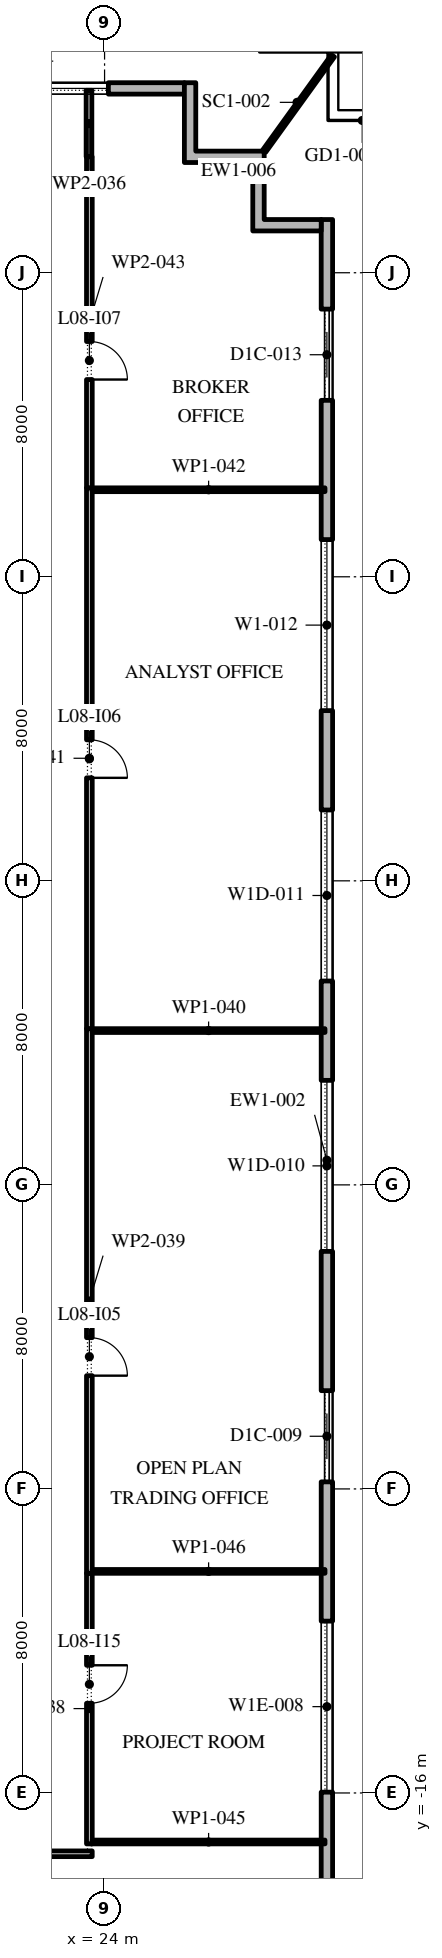
"""IFC4 building model, lengths in metres.
Left out: names, types, materials, properties, quantities, classifications, styles, units other than length and angle.
Written with IfcOpenShell. Run it as: python <this file> out.ifc"""

import sys

from ifc_helpers import new_model, si_unit, direction, frame, frame_2d, origin, place, context, subcontext, project, spatial, polyline, rectangle, outline, extrude, element, fill, save


model = new_model("IFC4")
c1 = context("Model", 3, precision=1e-05, world=origin(), true_north=direction((0.0, 1.0)))
c2 = subcontext(c1, "Body", "Model", "MODEL_VIEW")
j1 = project(units=[si_unit("LENGTHUNIT", "METRE"), si_unit("PLANEANGLEUNIT", "RADIAN")], contexts=[c1])
p1 = place(None, origin())
s1 = spatial("IfcSite", under=j1, at=p1, CompositionType="ELEMENT")
p2 = place(p1, origin())
s2 = spatial("IfcBuilding", under=s1, at=p2, CompositionType="ELEMENT")
p3 = place(p2, frame((0.0, 0.0, 43.8)))
s3 = spatial("IfcBuildingStorey", under=s2, at=p3, CompositionType="ELEMENT", Elevation=43.8)
p4 = place(p3, frame((29.85, -24.1, 0.0), z_axis=(0.0, 0.0, 1.0), x_axis=(0.0, 1.0, 0.0)))
e1 = element("IfcWall", 1, at=p4, inside=s3, PredefinedType="STANDARD", context=c2, shape_type="SweptSolid", body=[
    extrude(rectangle(XDim=49.5, YDim=0.3, at=frame_2d((24.75, 0.0))), origin(), (0.0, 0.0, 1.0), 4.0),
])
p5 = place(p4, frame((1.157, 0.0, 0.45)))
e2 = element("IfcOpeningElement", 2, at=p5, cuts=e1, PredefinedType="OPENING", context=c2, shape_type="SweptSolid", body=[
    extrude(rectangle(XDim=4.5, YDim=3.05, at=frame_2d((2.25, 1.525))), frame((0.0, 0.16, 0.0), z_axis=(0.0, -1.0, 0.0), x_axis=(1.0, 0.0, 0.0)), (0.0, 0.0, 1.0), 0.32),
])
p6 = place(p4, frame((8.121, 0.0, 0.45)))
e3 = element("IfcOpeningElement", 3, at=p6, cuts=e1, PredefinedType="OPENING", context=c2, shape_type="SweptSolid", body=[
    extrude(rectangle(XDim=4.5, YDim=2.825, at=frame_2d((2.25, 1.413))), frame((0.0, 0.16, 0.0), z_axis=(0.0, -1.0, 0.0), x_axis=(1.0, 0.0, 0.0)), (0.0, 0.0, 1.0), 0.32),
])
p7 = place(p4, frame((16.286, 0.0, 0.0)))
e4 = element("IfcOpeningElement", 4, at=p7, cuts=e1, PredefinedType="OPENING", context=c2, shape_type="SweptSolid", body=[
    extrude(rectangle(XDim=2.4, YDim=3.325, at=frame_2d((1.2, 1.663))), frame((0.0, 0.16, 0.0), z_axis=(0.0, -1.0, 0.0), x_axis=(1.0, 0.0, 0.0)), (0.0, 0.0, 1.0), 0.32),
])
p8 = place(p4, frame((22.35, 0.0, 0.45)))
e5 = element("IfcOpeningElement", 5, at=p8, cuts=e1, PredefinedType="OPENING", context=c2, shape_type="SweptSolid", body=[
    extrude(rectangle(XDim=4.5, YDim=2.875, at=frame_2d((2.25, 1.438))), frame((0.0, 0.16, 0.0), z_axis=(0.0, -1.0, 0.0), x_axis=(1.0, 0.0, 0.0)), (0.0, 0.0, 1.0), 0.32),
])
p9 = place(p4, frame((29.464, 0.0, 0.45)))
e6 = element("IfcOpeningElement", 6, at=p9, cuts=e1, PredefinedType="OPENING", context=c2, shape_type="SweptSolid", body=[
    extrude(rectangle(XDim=4.5, YDim=2.875, at=frame_2d((2.25, 1.438))), frame((0.0, 0.16, 0.0), z_axis=(0.0, -1.0, 0.0), x_axis=(1.0, 0.0, 0.0)), (0.0, 0.0, 1.0), 0.32),
])
p10 = place(p4, frame((36.579, 0.0, 0.45)))
e7 = element("IfcOpeningElement", 7, at=p10, cuts=e1, PredefinedType="OPENING", context=c2, shape_type="SweptSolid", body=[
    extrude(rectangle(XDim=4.5, YDim=3.05, at=frame_2d((2.25, 1.525))), frame((0.0, 0.16, 0.0), z_axis=(0.0, -1.0, 0.0), x_axis=(1.0, 0.0, 0.0)), (0.0, 0.0, 1.0), 0.32),
])
p11 = place(p4, frame((44.743, 0.0, 0.0)))
e8 = element("IfcOpeningElement", 8, at=p11, cuts=e1, PredefinedType="OPENING", context=c2, shape_type="SweptSolid", body=[
    extrude(rectangle(XDim=2.4, YDim=3.325, at=frame_2d((1.2, 1.663))), frame((0.0, 0.16, 0.0), z_axis=(0.0, -1.0, 0.0), x_axis=(1.0, 0.0, 0.0)), (0.0, 0.0, 1.0), 0.32),
])
p12 = place(p3, frame((26.1, 28.85, 0.0), z_axis=(0.0, 0.0, 1.0), x_axis=(-1.0, 0.0, 0.0)))
e9 = element("IfcWall", 9, at=p12, inside=s3, PredefinedType="STANDARD", context=c2, shape_type="SweptSolid", body=[
    extrude(rectangle(XDim=52.5, YDim=0.3, at=frame_2d((26.25, 0.0))), origin(), (0.0, 0.0, 1.0), 4.0),
])
p13 = place(p12, frame((2.0, 0.0, 0.45)))
e10 = element("IfcOpeningElement", 10, at=p13, cuts=e9, PredefinedType="OPENING", context=c2, shape_type="SweptSolid", body=[
    extrude(rectangle(XDim=4.5, YDim=3.05, at=frame_2d((2.25, 1.525))), frame((0.0, 0.16, 0.0), z_axis=(0.0, -1.0, 0.0), x_axis=(1.0, 0.0, 0.0)), (0.0, 0.0, 1.0), 0.32),
])
p14 = place(p12, frame((10.65, 0.0, 0.45)))
e11 = element("IfcOpeningElement", 11, at=p14, cuts=e9, PredefinedType="OPENING", context=c2, shape_type="SweptSolid", body=[
    extrude(rectangle(XDim=4.5, YDim=3.05, at=frame_2d((2.25, 1.525))), frame((0.0, 0.16, 0.0), z_axis=(0.0, -1.0, 0.0), x_axis=(1.0, 0.0, 0.0)), (0.0, 0.0, 1.0), 0.32),
])
p15 = place(p12, frame((20.5, 0.0, 0.0)))
e12 = element("IfcOpeningElement", 12, at=p15, cuts=e9, PredefinedType="OPENING", context=c2, shape_type="SweptSolid", body=[
    extrude(rectangle(XDim=2.4, YDim=3.5, at=frame_2d((1.2, 1.75))), frame((0.0, 0.16, 0.0), z_axis=(0.0, -1.0, 0.0), x_axis=(1.0, 0.0, 0.0)), (0.0, 0.0, 1.0), 0.32),
])
p16 = place(p12, frame((28.25, 0.0, 0.45)))
e13 = element("IfcOpeningElement", 13, at=p16, cuts=e9, PredefinedType="OPENING", context=c2, shape_type="SweptSolid", body=[
    extrude(rectangle(XDim=4.5, YDim=3.05, at=frame_2d((2.25, 1.525))), frame((0.0, 0.16, 0.0), z_axis=(0.0, -1.0, 0.0), x_axis=(1.0, 0.0, 0.0)), (0.0, 0.0, 1.0), 0.32),
])
p17 = place(p12, frame((37.05, 0.0, 0.45)))
e14 = element("IfcOpeningElement", 14, at=p17, cuts=e9, PredefinedType="OPENING", context=c2, shape_type="SweptSolid", body=[
    extrude(rectangle(XDim=4.5, YDim=3.05, at=frame_2d((2.25, 1.525))), frame((0.0, 0.16, 0.0), z_axis=(0.0, -1.0, 0.0), x_axis=(1.0, 0.0, 0.0)), (0.0, 0.0, 1.0), 0.32),
])
p18 = place(p12, frame((45.85, 0.0, 0.45)))
e15 = element("IfcOpeningElement", 15, at=p18, cuts=e9, PredefinedType="OPENING", context=c2, shape_type="SweptSolid", body=[
    extrude(rectangle(XDim=4.5, YDim=3.05, at=frame_2d((2.25, 1.525))), frame((0.0, 0.16, 0.0), z_axis=(0.0, -1.0, 0.0), x_axis=(1.0, 0.0, 0.0)), (0.0, 0.0, 1.0), 0.32),
])
p19 = place(p3, origin())
e16 = element("IfcWall", 16, at=p19, inside=s3, PredefinedType="STANDARD", context=c2, shape_type="SweptSolid", body=[
    extrude(outline(polyline([(27.9, 26.9), (26.1, 26.9), (26.1, 29.0), (26.4, 29.0), (26.4, 27.2), (28.2, 27.2), (28.2, 25.4), (29.7, 25.4), (29.7, 25.1), (27.9, 25.1), (27.9, 26.9)])), origin(), (0.0, 0.0, 1.0), 4.0),
])
p20 = place(p3, frame((28.2, 27.2, -0.05), z_axis=(0.0, 0.0, 1.0), x_axis=(0.585017780353, 0.811020466246, 0.0)))
e17 = element("IfcWall", 17, at=p20, inside=s3, PredefinedType="STANDARD", context=c2, shape_type="SweptSolid", body=[
    extrude(rectangle(XDim=3.093, YDim=0.1, at=frame_2d((1.546, 0.0))), origin(), (0.0, 0.0, 1.0), 4.05),
])
p21 = place(p3, frame((23.59, 28.8, 0.0), z_axis=(0.0, 0.0, 1.0), x_axis=(0.0, -1.0, 0.0)))
e18 = element("IfcWall", 18, at=p21, inside=s3, PredefinedType="PARTITIONING", context=c2, shape_type="SweptSolid", body=[
    extrude(rectangle(XDim=1.75, YDim=0.15, at=frame_2d((0.875, 0.0))), origin(), (0.0, 0.0, 1.0), 4.0),
])
p22 = place(p3, frame((23.675, -17.6, 0.0), z_axis=(0.0, 0.0, 1.0), x_axis=(-1.0, 0.0, 0.0)))
e19 = element("IfcWall", 19, at=p22, inside=s3, PredefinedType="PARTITIONING", context=c2, shape_type="SweptSolid", body=[
    extrude(rectangle(XDim=8.675, YDim=0.15, at=frame_2d((4.337, 0.0))), origin(), (0.0, 0.0, 1.0), 4.0),
])
p23 = place(p22, frame((3.775, 0.0, 0.0)))
e20 = element("IfcOpeningElement", 20, at=p23, cuts=e19, PredefinedType="OPENING", context=c2, shape_type="SweptSolid", body=[
    extrude(rectangle(XDim=1.0, YDim=2.1, at=frame_2d((0.5, 1.05))), frame((0.0, 0.085, 0.0), z_axis=(0.0, -1.0, 0.0), x_axis=(1.0, 0.0, 0.0)), (0.0, 0.0, 1.0), 0.17),
])
p24 = place(p3, frame((23.6, -10.22, 0.0), z_axis=(0.0, 0.0, 1.0), x_axis=(0.0, -1.0, 0.0)))
e21 = element("IfcWall", 21, at=p24, inside=s3, PredefinedType="PARTITIONING", context=c2, shape_type="SweptSolid", body=[
    extrude(rectangle(XDim=7.12, YDim=0.15, at=frame_2d((3.56, 0.0))), origin(), (0.0, 0.0, 1.0), 4.0),
])
p25 = place(p24, frame((2.42, 0.0, 0.0)))
e22 = element("IfcOpeningElement", 22, at=p25, cuts=e21, PredefinedType="OPENING", context=c2, shape_type="SweptSolid", body=[
    extrude(rectangle(XDim=1.0, YDim=2.1, at=frame_2d((0.5, 1.05))), frame((0.0, 0.085, 0.0), z_axis=(0.0, -1.0, 0.0), x_axis=(1.0, 0.0, 0.0)), (0.0, 0.0, 1.0), 0.17),
])
p26 = place(p3, frame((23.6, 4.11, 0.0), z_axis=(0.0, 0.0, 1.0), x_axis=(0.0, -1.0, 0.0)))
e23 = element("IfcWall", 23, at=p26, inside=s3, PredefinedType="PARTITIONING", context=c2, shape_type="SweptSolid", body=[
    extrude(rectangle(XDim=14.33, YDim=0.15, at=frame_2d((7.165, 0.0))), origin(), (0.0, 0.0, 1.0), 4.0),
])
p27 = place(p26, frame((8.13, 0.0, 0.0)))
e24 = element("IfcOpeningElement", 24, at=p27, cuts=e23, PredefinedType="OPENING", context=c2, shape_type="SweptSolid", body=[
    extrude(rectangle(XDim=1.0, YDim=2.1, at=frame_2d((0.5, 1.05))), frame((0.0, 0.085, 0.0), z_axis=(0.0, -1.0, 0.0), x_axis=(1.0, 0.0, 0.0)), (0.0, 0.0, 1.0), 0.17),
])
p28 = place(p3, frame((23.675, 4.06, 0.0), z_axis=(0.0, 0.0, 1.0), x_axis=(1.0, 0.0, 0.0)))
e25 = element("IfcWall", 25, at=p28, inside=s3, PredefinedType="PARTITIONING", context=c2, shape_type="SweptSolid", body=[
    extrude(rectangle(XDim=6.125, YDim=0.1, at=frame_2d((3.062, 0.0))), origin(), (0.0, 0.0, 1.0), 4.0),
])
p29 = place(p3, frame((23.6, 18.34, 0.0), z_axis=(0.0, 0.0, 1.0), x_axis=(0.0, -1.0, 0.0)))
e26 = element("IfcWall", 26, at=p29, inside=s3, PredefinedType="PARTITIONING", context=c2, shape_type="SweptSolid", body=[
    extrude(rectangle(XDim=14.23, YDim=0.15, at=frame_2d((7.115, 0.0))), origin(), (0.0, 0.0, 1.0), 4.0),
])
p30 = place(p29, frame((6.63, 0.0, 0.0)))
e27 = element("IfcOpeningElement", 27, at=p30, cuts=e26, PredefinedType="OPENING", context=c2, shape_type="SweptSolid", body=[
    extrude(rectangle(XDim=1.0, YDim=2.1, at=frame_2d((0.5, 1.05))), frame((0.0, 0.085, 0.0), z_axis=(0.0, -1.0, 0.0), x_axis=(1.0, 0.0, 0.0)), (0.0, 0.0, 1.0), 0.17),
])
p31 = place(p3, frame((23.675, 18.29, 0.0), z_axis=(0.0, 0.0, 1.0), x_axis=(1.0, 0.0, 0.0)))
e28 = element("IfcWall", 28, at=p31, inside=s3, PredefinedType="PARTITIONING", context=c2, shape_type="SweptSolid", body=[
    extrude(rectangle(XDim=6.125, YDim=0.1, at=frame_2d((3.062, 0.0))), origin(), (0.0, 0.0, 1.0), 4.0),
])
p32 = place(p3, frame((23.6, 27.05, 0.0), z_axis=(0.0, 0.0, 1.0), x_axis=(0.0, -1.0, 0.0)))
e29 = element("IfcWall", 29, at=p32, inside=s3, PredefinedType="PARTITIONING", context=c2, shape_type="SweptSolid", body=[
    extrude(rectangle(XDim=8.71, YDim=0.15, at=frame_2d((4.355, 0.0))), origin(), (0.0, 0.0, 1.0), 4.0),
])
p33 = place(p32, frame((4.86, 0.0, 0.0)))
e30 = element("IfcOpeningElement", 30, at=p33, cuts=e29, PredefinedType="OPENING", context=c2, shape_type="SweptSolid", body=[
    extrude(rectangle(XDim=1.0, YDim=2.1, at=frame_2d((0.5, 1.05))), frame((0.0, 0.085, 0.0), z_axis=(0.0, -1.0, 0.0), x_axis=(1.0, 0.0, 0.0)), (0.0, 0.0, 1.0), 0.17),
])
for number, where, z_axis, x_axis in (
    (31, (29.8, -17.29, 0.0), (0.0, 0.0, 1.0), (-1.0, 0.0, 0.0)),
    (32, (29.8, -10.17, 0.0), (0.0, 0.0, 1.0), (-1.0, 0.0, 0.0)),
):
    element("IfcWall", number, at=place(p3, frame(where, z_axis=z_axis, x_axis=x_axis)), inside=s3, PredefinedType="PARTITIONING", context=c2, shape_type="SweptSolid", body=[
        extrude(rectangle(XDim=6.125, YDim=0.1, at=frame_2d((3.062, 0.0))), origin(), (0.0, 0.0, 1.0), 4.0),
    ])
p34 = place(p6, origin())
e33 = element("IfcWindow", 33, at=p34, inside=s3, PartitioningType="DOUBLE_PANEL_VERTICAL", PredefinedType="WINDOW", context=c2, shape_type="SweptSolid", body=[
    extrude(rectangle(XDim=4.5, YDim=2.825, at=frame_2d((2.25, 1.413))), frame((0.0, 0.03, 0.0), z_axis=(0.0, -1.0, 0.0), x_axis=(1.0, 0.0, 0.0)), (0.0, 0.0, 1.0), 0.06),
])
fill(e3, e33)
p35 = place(p7, origin())
e34 = element("IfcDoor", 34, at=p35, inside=s3, OperationType="DOUBLE_DOOR_SLIDING", PredefinedType="DOOR", context=c2, shape_type="SweptSolid", body=[
    extrude(rectangle(XDim=2.4, YDim=3.325, at=frame_2d((1.2, 1.663))), frame((0.0, 0.025, 0.0), z_axis=(0.0, -1.0, 0.0), x_axis=(1.0, 0.0, 0.0)), (0.0, 0.0, 1.0), 0.05),
])
fill(e4, e34)
p36 = place(p8, origin())
e35 = element("IfcWindow", 35, at=p36, inside=s3, PartitioningType="DOUBLE_PANEL_VERTICAL", PredefinedType="WINDOW", context=c2, shape_type="SweptSolid", body=[
    extrude(rectangle(XDim=4.5, YDim=2.875, at=frame_2d((2.25, 1.438))), frame((0.0, 0.03, 0.0), z_axis=(0.0, -1.0, 0.0), x_axis=(1.0, 0.0, 0.0)), (0.0, 0.0, 1.0), 0.06),
])
fill(e5, e35)
p37 = place(p9, origin())
e36 = element("IfcWindow", 36, at=p37, inside=s3, PartitioningType="DOUBLE_PANEL_VERTICAL", PredefinedType="WINDOW", context=c2, shape_type="SweptSolid", body=[
    extrude(rectangle(XDim=4.5, YDim=2.875, at=frame_2d((2.25, 1.438))), frame((0.0, 0.03, 0.0), z_axis=(0.0, -1.0, 0.0), x_axis=(1.0, 0.0, 0.0)), (0.0, 0.0, 1.0), 0.06),
])
fill(e6, e36)
p38 = place(p10, origin())
e37 = element("IfcWindow", 37, at=p38, inside=s3, PartitioningType="DOUBLE_PANEL_VERTICAL", PredefinedType="WINDOW", context=c2, shape_type="SweptSolid", body=[
    extrude(rectangle(XDim=4.5, YDim=3.05, at=frame_2d((2.25, 1.525))), frame((0.0, 0.03, 0.0), z_axis=(0.0, -1.0, 0.0), x_axis=(1.0, 0.0, 0.0)), (0.0, 0.0, 1.0), 0.06),
])
fill(e7, e37)
p39 = place(p11, origin())
e38 = element("IfcDoor", 38, at=p39, inside=s3, OperationType="DOUBLE_DOOR_SLIDING", PredefinedType="DOOR", context=c2, shape_type="SweptSolid", body=[
    extrude(rectangle(XDim=2.4, YDim=3.325, at=frame_2d((1.2, 1.663))), frame((0.0, 0.025, 0.0), z_axis=(0.0, -1.0, 0.0), x_axis=(1.0, 0.0, 0.0)), (0.0, 0.0, 1.0), 0.05),
])
fill(e8, e38)
p40 = place(p13, origin())
e39 = element("IfcWindow", 39, at=p40, inside=s3, PartitioningType="DOUBLE_PANEL_VERTICAL", PredefinedType="WINDOW", context=c2, shape_type="SweptSolid", body=[
    extrude(rectangle(XDim=4.5, YDim=3.05, at=frame_2d((2.25, 1.525))), frame((0.0, 0.03, 0.0), z_axis=(0.0, -1.0, 0.0), x_axis=(1.0, 0.0, 0.0)), (0.0, 0.0, 1.0), 0.06),
])
fill(e10, e39)
p41 = place(p27, origin())
e40 = element("IfcDoor", 40, at=p41, inside=s3, OperationType="SINGLE_SWING_LEFT", PredefinedType="DOOR", context=c2, shape_type="SweptSolid", body=[
    extrude(rectangle(XDim=1.0, YDim=2.1, at=frame_2d((0.5, 1.05))), frame((0.0, 0.025, 0.0), z_axis=(0.0, -1.0, 0.0), x_axis=(1.0, 0.0, 0.0)), (0.0, 0.0, 1.0), 0.05),
])
fill(e24, e40)
p42 = place(p30, origin())
e41 = element("IfcDoor", 41, at=p42, inside=s3, OperationType="SINGLE_SWING_LEFT", PredefinedType="DOOR", context=c2, shape_type="SweptSolid", body=[
    extrude(rectangle(XDim=1.0, YDim=2.1, at=frame_2d((0.5, 1.05))), frame((0.0, 0.025, 0.0), z_axis=(0.0, -1.0, 0.0), x_axis=(1.0, 0.0, 0.0)), (0.0, 0.0, 1.0), 0.05),
])
fill(e27, e41)
p43 = place(p33, origin())
e42 = element("IfcDoor", 42, at=p43, inside=s3, OperationType="SINGLE_SWING_LEFT", PredefinedType="DOOR", context=c2, shape_type="SweptSolid", body=[
    extrude(rectangle(XDim=1.0, YDim=2.1, at=frame_2d((0.5, 1.05))), frame((0.0, 0.025, 0.0), z_axis=(0.0, -1.0, 0.0), x_axis=(1.0, 0.0, 0.0)), (0.0, 0.0, 1.0), 0.05),
])
fill(e30, e42)
p44 = place(p25, origin())
e43 = element("IfcDoor", 43, at=p44, inside=s3, OperationType="SINGLE_SWING_RIGHT", PredefinedType="DOOR", context=c2, shape_type="SweptSolid", body=[
    extrude(rectangle(XDim=1.0, YDim=2.1, at=frame_2d((0.5, 1.05))), frame((0.0, 0.025, 0.0), z_axis=(0.0, -1.0, 0.0), x_axis=(1.0, 0.0, 0.0)), (0.0, 0.0, 1.0), 0.05),
])
fill(e22, e43)
save(model, sys.argv[1])
